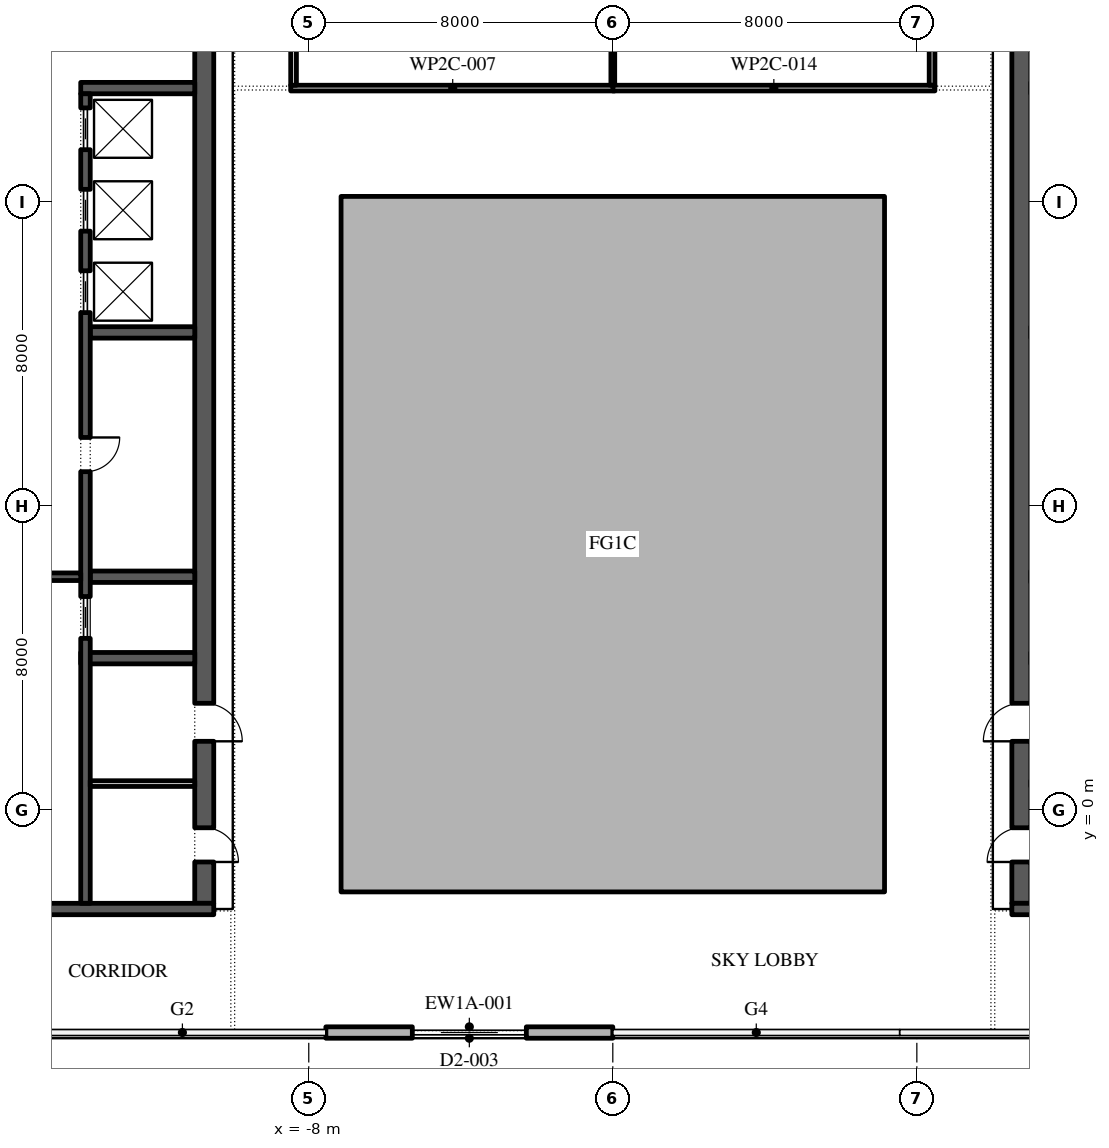
"""IFC4 building model, lengths in metres.
Left out: names, types, materials, properties, quantities, classifications, styles, units other than length and angle.
Written with IfcOpenShell. Run it as: python <this file> out.ifc"""

import sys

from ifc_helpers import new_model, si_unit, direction, frame, frame_2d, origin, place, context, subcontext, project, spatial, polyline, rectangle, outline, extrude, element, fill, save


model = new_model("IFC4")
c1 = context("Model", 3, precision=1e-05, world=origin(), true_north=direction((0.0, 1.0)))
c2 = subcontext(c1, "Body", "Model", "MODEL_VIEW")
j1 = project(units=[si_unit("LENGTHUNIT", "METRE"), si_unit("PLANEANGLEUNIT", "RADIAN")], contexts=[c1])
p1 = place(None, origin())
s1 = spatial("IfcSite", under=j1, at=p1, CompositionType="ELEMENT")
p2 = place(p1, origin())
s2 = spatial("IfcBuilding", under=s1, at=p2, CompositionType="ELEMENT")
p3 = place(p2, frame((0.0, 0.0, 303.0)))
s3 = spatial("IfcBuildingStorey", under=s2, at=p3, CompositionType="ELEMENT", Elevation=303.0)
p4 = place(p3, origin())
e1 = element("IfcWall", 1, at=p4, inside=s3, PredefinedType="STANDARD", context=c2, shape_type="SweptSolid", body=[
    extrude(outline(polyline([(-7.15, -2.15), (7.15, -2.15), (7.15, 16.15), (-7.15, 16.15), (-7.15, -2.15)]), holes=[polyline([(-7.0, -2.0), (-7.0, 16.0), (7.0, 16.0), (7.0, -2.0), (-7.0, -2.0)])]), origin(), (0.0, 0.0, 1.0), 5.8),
])
p5 = place(p3, frame((-7.55, -5.85, 0.0), z_axis=(0.0, 0.0, 1.0), x_axis=(1.0, 0.0, 0.0)))
e2 = element("IfcWall", 2, at=p5, inside=s3, PredefinedType="STANDARD", context=c2, shape_type="SweptSolid", body=[
    extrude(rectangle(XDim=7.55, YDim=0.3, at=frame_2d((3.775, 0.0))), origin(), (0.0, 0.0, 1.0), 5.8),
])
p6 = place(p5, frame((2.275, 0.0, 0.0)))
e3 = element("IfcOpeningElement", 3, at=p6, cuts=e2, PredefinedType="OPENING", context=c2, shape_type="SweptSolid", body=[
    extrude(rectangle(XDim=3.0, YDim=3.5, at=frame_2d((1.5, 1.75))), frame((0.0, 0.16, 0.0), z_axis=(0.0, -1.0, 0.0), x_axis=(1.0, 0.0, 0.0)), (0.0, 0.0, 1.0), 0.32),
])
p7 = place(p3, frame((-10.75, -2.45, 0.0), z_axis=(0.0, 0.0, 1.0), x_axis=(0.0, 1.0, 0.0)))
e4 = element("IfcWall", 4, at=p7, inside=s3, PredefinedType="SHEAR", context=c2, shape_type="SweptSolid", body=[
    extrude(rectangle(XDim=27.9, YDim=0.5, at=frame_2d((13.95, 0.0))), origin(), (0.0, 0.0, 1.0), 5.8),
])
p8 = place(p7, frame((23.65, 0.0, 0.0)))
e5 = element("IfcOpeningElement", 5, at=p8, cuts=e4, PredefinedType="OPENING", context=c2, shape_type="SweptSolid", body=[
    extrude(rectangle(XDim=2.4, YDim=2.1, at=frame_2d((1.2, 1.05))), frame((0.0, 0.26, 0.0), z_axis=(0.0, -1.0, 0.0), x_axis=(1.0, 0.0, 0.0)), (0.0, 0.0, 1.0), 0.52),
])
p9 = place(p7, frame((1.087, 0.0, 0.0)))
e6 = element("IfcOpeningElement", 6, at=p9, cuts=e4, PredefinedType="OPENING", context=c2, shape_type="SweptSolid", body=[
    extrude(rectangle(XDim=0.9, YDim=2.1, at=frame_2d((0.45, 1.05))), frame((0.0, 0.26, 0.0), z_axis=(0.0, -1.0, 0.0), x_axis=(1.0, 0.0, 0.0)), (0.0, 0.0, 1.0), 0.52),
])
p10 = place(p7, frame((4.262, 0.0, 0.0)))
e7 = element("IfcOpeningElement", 7, at=p10, cuts=e4, PredefinedType="OPENING", context=c2, shape_type="SweptSolid", body=[
    extrude(rectangle(XDim=1.0, YDim=2.1, at=frame_2d((0.5, 1.05))), frame((0.0, 0.26, 0.0), z_axis=(0.0, -1.0, 0.0), x_axis=(1.0, 0.0, 0.0)), (0.0, 0.0, 1.0), 0.52),
])
p11 = place(p3, frame((-21.5, -2.6, 0.0), z_axis=(0.0, 0.0, 1.0), x_axis=(1.0, 0.0, 0.0)))
e8 = element("IfcWall", 8, at=p11, inside=s3, PredefinedType="SHEAR", context=c2, shape_type="SweptSolid", body=[
    extrude(rectangle(XDim=11.0, YDim=0.3, at=frame_2d((5.5, 0.0))), origin(), (0.0, 0.0, 1.0), 5.8),
])
p12 = place(p3, frame((-14.0, 4.0, 0.0), z_axis=(0.0, 0.0, 1.0), x_axis=(1.0, 0.0, 0.0)))
e9 = element("IfcWall", 9, at=p12, inside=s3, PredefinedType="SHEAR", context=c2, shape_type="SweptSolid", body=[
    extrude(rectangle(XDim=3.0, YDim=0.3, at=frame_2d((1.5, 0.0))), origin(), (0.0, 0.0, 1.0), 5.8),
])
for number, where, z_axis, x_axis in (
    (10, (-13.75, 6.143, 0.0), (0.0, 0.0, 1.0), (1.0, 0.0, 0.0)),
    (11, (-13.75, 12.571, 0.0), (0.0, 0.0, 1.0), (1.0, 0.0, 0.0)),
):
    element("IfcWall", number, at=place(p3, frame(where, z_axis=z_axis, x_axis=x_axis)), inside=s3, PredefinedType="SHEAR", context=c2, shape_type="SweptSolid", body=[
        extrude(rectangle(XDim=2.75, YDim=0.3, at=frame_2d((1.375, 0.0))), origin(), (0.0, 0.0, 1.0), 5.8),
    ])
p13 = place(p3, frame((-14.0, 19.0, 0.0), z_axis=(0.0, 0.0, 1.0), x_axis=(1.0, 0.0, 0.0)))
e12 = element("IfcWall", 12, at=p13, inside=s3, PredefinedType="SHEAR", context=c2, shape_type="SweptSolid", body=[
    extrude(rectangle(XDim=3.0, YDim=0.3, at=frame_2d((1.5, 0.0))), origin(), (0.0, 0.0, 1.0), 5.8),
])
p14 = place(p3, frame((-13.875, -2.45, 0.0), z_axis=(0.0, 0.0, 1.0), x_axis=(0.0, 1.0, 0.0)))
e13 = element("IfcWall", 13, at=p14, inside=s3, PredefinedType="SHEAR", context=c2, shape_type="SweptSolid", body=[
    extrude(rectangle(XDim=21.3, YDim=0.25, at=frame_2d((10.65, 0.0))), origin(), (0.0, 0.0, 1.0), 5.8),
])
p15 = place(p14, frame((11.357, 0.0, 0.0)))
e14 = element("IfcOpeningElement", 14, at=p15, cuts=e13, PredefinedType="OPENING", context=c2, shape_type="SweptSolid", body=[
    extrude(rectangle(XDim=0.9, YDim=2.1, at=frame_2d((0.45, 1.05))), frame((0.0, 0.135, 0.0), z_axis=(0.0, -1.0, 0.0), x_axis=(1.0, 0.0, 0.0)), (0.0, 0.0, 1.0), 0.27),
])
p16 = place(p14, frame((6.971, 0.0, 0.0)))
e15 = element("IfcOpeningElement", 15, at=p16, cuts=e13, PredefinedType="OPENING", context=c2, shape_type="SweptSolid", body=[
    extrude(rectangle(XDim=1.1, YDim=2.1, at=frame_2d((0.55, 1.05))), frame((0.0, 0.135, 0.0), z_axis=(0.0, -1.0, 0.0), x_axis=(1.0, 0.0, 0.0)), (0.0, 0.0, 1.0), 0.27),
])
p17 = place(p14, frame((15.543, 0.0, 0.0)))
e16 = element("IfcOpeningElement", 16, at=p17, cuts=e13, PredefinedType="OPENING", context=c2, shape_type="SweptSolid", body=[
    extrude(rectangle(XDim=1.1, YDim=2.1, at=frame_2d((0.55, 1.05))), frame((0.0, 0.135, 0.0), z_axis=(0.0, -1.0, 0.0), x_axis=(1.0, 0.0, 0.0)), (0.0, 0.0, 1.0), 0.27),
])
p18 = place(p14, frame((17.686, 0.0, 0.0)))
e17 = element("IfcOpeningElement", 17, at=p18, cuts=e13, PredefinedType="OPENING", context=c2, shape_type="SweptSolid", body=[
    extrude(rectangle(XDim=1.1, YDim=2.1, at=frame_2d((0.55, 1.05))), frame((0.0, 0.135, 0.0), z_axis=(0.0, -1.0, 0.0), x_axis=(1.0, 0.0, 0.0)), (0.0, 0.0, 1.0), 0.27),
])
p19 = place(p14, frame((19.829, 0.0, 0.0)))
e18 = element("IfcOpeningElement", 18, at=p19, cuts=e13, PredefinedType="OPENING", context=c2, shape_type="SweptSolid", body=[
    extrude(rectangle(XDim=1.1, YDim=2.1, at=frame_2d((0.55, 1.05))), frame((0.0, 0.135, 0.0), z_axis=(0.0, -1.0, 0.0), x_axis=(1.0, 0.0, 0.0)), (0.0, 0.0, 1.0), 0.27),
])
p20 = place(p3, frame((-18.0, 6.143, 0.0), z_axis=(0.0, 0.0, 1.0), x_axis=(1.0, 0.0, 0.0)))
e19 = element("IfcWall", 19, at=p20, inside=s3, PredefinedType="SHEAR", context=c2, shape_type="SweptSolid", body=[
    extrude(rectangle(XDim=4.0, YDim=0.2, at=frame_2d((2.0, 0.0))), origin(), (0.0, 0.0, 1.0), 5.8),
])
p21 = place(p20, frame((1.4, 0.0, 0.0)))
e20 = element("IfcOpeningElement", 20, at=p21, cuts=e19, PredefinedType="OPENING", context=c2, shape_type="SweptSolid", body=[
    extrude(rectangle(XDim=1.2, YDim=2.1, at=frame_2d((0.6, 1.05))), frame((0.0, 0.11, 0.0), z_axis=(0.0, -1.0, 0.0), x_axis=(1.0, 0.0, 0.0)), (0.0, 0.0, 1.0), 0.22),
])
p22 = place(p3, frame((-13.75, 0.7, 0.0), z_axis=(0.0, 0.0, 1.0), x_axis=(1.0, 0.0, 0.0)))
e21 = element("IfcWall", 21, at=p22, inside=s3, PredefinedType="PARTITIONING", context=c2, shape_type="SweptSolid", body=[
    extrude(rectangle(XDim=2.75, YDim=0.15, at=frame_2d((1.375, 0.0))), origin(), (0.0, 0.0, 1.0), 5.8),
])
p23 = place(p3, frame((10.75, -2.45, 0.0), z_axis=(0.0, 0.0, 1.0), x_axis=(0.0, 1.0, 0.0)))
e22 = element("IfcWall", 22, at=p23, inside=s3, PredefinedType="SHEAR", context=c2, shape_type="SweptSolid", body=[
    extrude(rectangle(XDim=27.9, YDim=0.5, at=frame_2d((13.95, 0.0))), origin(), (0.0, 0.0, 1.0), 5.8),
])
p24 = place(p23, frame((23.65, 0.0, 0.0)))
e23 = element("IfcOpeningElement", 23, at=p24, cuts=e22, PredefinedType="OPENING", context=c2, shape_type="SweptSolid", body=[
    extrude(rectangle(XDim=2.4, YDim=2.1, at=frame_2d((1.2, 1.05))), frame((0.0, 0.26, 0.0), z_axis=(0.0, -1.0, 0.0), x_axis=(1.0, 0.0, 0.0)), (0.0, 0.0, 1.0), 0.52),
])
p25 = place(p23, frame((1.087, 0.0, 0.0)))
e24 = element("IfcOpeningElement", 24, at=p25, cuts=e22, PredefinedType="OPENING", context=c2, shape_type="SweptSolid", body=[
    extrude(rectangle(XDim=0.9, YDim=2.1, at=frame_2d((0.45, 1.05))), frame((0.0, 0.26, 0.0), z_axis=(0.0, -1.0, 0.0), x_axis=(1.0, 0.0, 0.0)), (0.0, 0.0, 1.0), 0.52),
])
p26 = place(p23, frame((4.262, 0.0, 0.0)))
e25 = element("IfcOpeningElement", 25, at=p26, cuts=e22, PredefinedType="OPENING", context=c2, shape_type="SweptSolid", body=[
    extrude(rectangle(XDim=1.0, YDim=2.1, at=frame_2d((0.5, 1.05))), frame((0.0, 0.26, 0.0), z_axis=(0.0, -1.0, 0.0), x_axis=(1.0, 0.0, 0.0)), (0.0, 0.0, 1.0), 0.52),
])
p27 = place(p3, frame((10.5, -2.6, 0.0), z_axis=(0.0, 0.0, 1.0), x_axis=(1.0, 0.0, 0.0)))
e26 = element("IfcWall", 26, at=p27, inside=s3, PredefinedType="SHEAR", context=c2, shape_type="SweptSolid", body=[
    extrude(rectangle(XDim=11.0, YDim=0.3, at=frame_2d((5.5, 0.0))), origin(), (0.0, 0.0, 1.0), 5.8),
])
p28 = place(p3, frame((-8.475, 19.0, 0.0), z_axis=(0.0, 0.0, 1.0), x_axis=(1.0, 0.0, 0.0)))
e27 = element("IfcWall", 27, at=p28, inside=s3, PredefinedType="PARTITIONING", context=c2, shape_type="SweptSolid", body=[
    extrude(rectangle(XDim=8.525, YDim=0.15, at=frame_2d((4.263, 0.0))), origin(), (0.0, 0.0, 1.0), 5.8),
])
p29 = place(p3, frame((-8.4, 32.05, 0.0), z_axis=(0.0, 0.0, 1.0), x_axis=(0.0, -1.0, 0.0)))
e28 = element("IfcWall", 28, at=p29, inside=s3, PredefinedType="PARTITIONING", context=c2, shape_type="SweptSolid", body=[
    extrude(rectangle(XDim=12.975, YDim=0.15, at=frame_2d((6.488, 0.0))), origin(), (0.0, 0.0, 1.0), 5.8),
])
p30 = place(p29, frame((8.65, 0.0, 0.0)))
e29 = element("IfcOpeningElement", 29, at=p30, cuts=e28, PredefinedType="OPENING", context=c2, shape_type="SweptSolid", body=[
    extrude(rectangle(XDim=1.0, YDim=2.1, at=frame_2d((0.5, 1.05))), frame((0.0, 0.085, 0.0), z_axis=(0.0, -1.0, 0.0), x_axis=(1.0, 0.0, 0.0)), (0.0, 0.0, 1.0), 0.17),
])
p31 = place(p3, frame((0.0, 19.075, 0.0), z_axis=(0.0, 0.0, 1.0), x_axis=(0.0, 1.0, 0.0)))
e30 = element("IfcWall", 30, at=p31, inside=s3, PredefinedType="PARTITIONING", context=c2, shape_type="SweptSolid", body=[
    extrude(rectangle(XDim=12.975, YDim=0.1, at=frame_2d((6.488, 0.0))), origin(), (0.0, 0.0, 1.0), 5.8),
])
p32 = place(p3, frame((0.0, 19.0, 0.0), z_axis=(0.0, 0.0, 1.0), x_axis=(1.0, 0.0, 0.0)))
e31 = element("IfcWall", 31, at=p32, inside=s3, PredefinedType="PARTITIONING", context=c2, shape_type="SweptSolid", body=[
    extrude(rectangle(XDim=8.475, YDim=0.15, at=frame_2d((4.238, 0.0))), origin(), (0.0, 0.0, 1.0), 5.8),
])
p33 = place(p3, frame((8.4, 19.075, 0.0), z_axis=(0.0, 0.0, 1.0), x_axis=(0.0, 1.0, 0.0)))
e32 = element("IfcWall", 32, at=p33, inside=s3, PredefinedType="PARTITIONING", context=c2, shape_type="SweptSolid", body=[
    extrude(rectangle(XDim=12.975, YDim=0.15, at=frame_2d((6.488, 0.0))), origin(), (0.0, 0.0, 1.0), 5.8),
])
p34 = place(p33, frame((8.525, 0.0, 0.0)))
e33 = element("IfcOpeningElement", 33, at=p34, cuts=e32, PredefinedType="OPENING", context=c2, shape_type="SweptSolid", body=[
    extrude(rectangle(XDim=1.0, YDim=2.1, at=frame_2d((0.5, 1.05))), frame((0.0, 0.085, 0.0), z_axis=(0.0, -1.0, 0.0), x_axis=(1.0, 0.0, 0.0)), (0.0, 0.0, 1.0), 0.17),
])
p35 = place(p6, origin())
e34 = element("IfcDoor", 34, at=p35, inside=s3, OperationType="DOUBLE_DOOR_SLIDING", PredefinedType="DOOR", context=c2, shape_type="SweptSolid", body=[
    extrude(rectangle(XDim=3.0, YDim=3.5, at=frame_2d((1.5, 1.75))), frame((0.0, 0.025, 0.0), z_axis=(0.0, -1.0, 0.0), x_axis=(1.0, 0.0, 0.0)), (0.0, 0.0, 1.0), 0.05),
])
fill(e3, e34)
p36 = place(p15, frame((0.9, -0.2, 0.0), z_axis=(0.0, 0.0, 1.0), x_axis=(-1.0, 0.0, 0.0)))
e35 = element("IfcDoor", 35, at=p36, inside=s3, OperationType="SINGLE_SWING_RIGHT", PredefinedType="DOOR", context=c2, shape_type="SweptSolid", body=[
    extrude(rectangle(XDim=0.9, YDim=2.1, at=frame_2d((0.45, 1.05))), frame((0.0, -0.075, 0.0), z_axis=(0.0, -1.0, 0.0), x_axis=(1.0, 0.0, 0.0)), (0.0, 0.0, 1.0), 0.05),
])
fill(e14, e35)
p37 = place(p16, origin())
e36 = element("IfcDoor", 36, at=p37, inside=s3, OperationType="SLIDING_TO_LEFT", PredefinedType="DOOR", context=c2, shape_type="SweptSolid", body=[
    extrude(rectangle(XDim=1.1, YDim=2.1, at=frame_2d((0.55, 1.05))), frame((0.0, 0.025, 0.0), z_axis=(0.0, -1.0, 0.0), x_axis=(1.0, 0.0, 0.0)), (0.0, 0.0, 1.0), 0.05),
])
fill(e15, e36)
p38 = place(p17, origin())
e37 = element("IfcDoor", 37, at=p38, inside=s3, OperationType="SLIDING_TO_LEFT", PredefinedType="DOOR", context=c2, shape_type="SweptSolid", body=[
    extrude(rectangle(XDim=1.1, YDim=2.1, at=frame_2d((0.55, 1.05))), frame((0.0, 0.025, 0.0), z_axis=(0.0, -1.0, 0.0), x_axis=(1.0, 0.0, 0.0)), (0.0, 0.0, 1.0), 0.05),
])
fill(e16, e37)
p39 = place(p18, origin())
e38 = element("IfcDoor", 38, at=p39, inside=s3, OperationType="SLIDING_TO_LEFT", PredefinedType="DOOR", context=c2, shape_type="SweptSolid", body=[
    extrude(rectangle(XDim=1.1, YDim=2.1, at=frame_2d((0.55, 1.05))), frame((0.0, 0.025, 0.0), z_axis=(0.0, -1.0, 0.0), x_axis=(1.0, 0.0, 0.0)), (0.0, 0.0, 1.0), 0.05),
])
fill(e17, e38)
p40 = place(p19, origin())
e39 = element("IfcDoor", 39, at=p40, inside=s3, OperationType="SLIDING_TO_LEFT", PredefinedType="DOOR", context=c2, shape_type="SweptSolid", body=[
    extrude(rectangle(XDim=1.1, YDim=2.1, at=frame_2d((0.55, 1.05))), frame((0.0, 0.025, 0.0), z_axis=(0.0, -1.0, 0.0), x_axis=(1.0, 0.0, 0.0)), (0.0, 0.0, 1.0), 0.05),
])
fill(e18, e39)
p41 = place(p9, frame((0.9, 0.45, 0.0), z_axis=(0.0, 0.0, 1.0), x_axis=(-1.0, 0.0, 0.0)))
e40 = element("IfcDoor", 40, at=p41, inside=s3, OperationType="SINGLE_SWING_LEFT", PredefinedType="DOOR", context=c2, shape_type="SweptSolid", body=[
    extrude(rectangle(XDim=0.9, YDim=2.1, at=frame_2d((0.45, 1.05))), frame((0.0, 0.25, 0.0), z_axis=(0.0, -1.0, 0.0), x_axis=(1.0, 0.0, 0.0)), (0.0, 0.0, 1.0), 0.05),
])
fill(e6, e40)
p42 = place(p10, frame((1.0, 0.45, 0.0), z_axis=(0.0, 0.0, 1.0), x_axis=(-1.0, 0.0, 0.0)))
e41 = element("IfcDoor", 41, at=p42, inside=s3, OperationType="SINGLE_SWING_LEFT", PredefinedType="DOOR", context=c2, shape_type="SweptSolid", body=[
    extrude(rectangle(XDim=1.0, YDim=2.1, at=frame_2d((0.5, 1.05))), frame((0.0, 0.25, 0.0), z_axis=(0.0, -1.0, 0.0), x_axis=(1.0, 0.0, 0.0)), (0.0, 0.0, 1.0), 0.05),
])
fill(e7, e41)
save(model, sys.argv[1])
